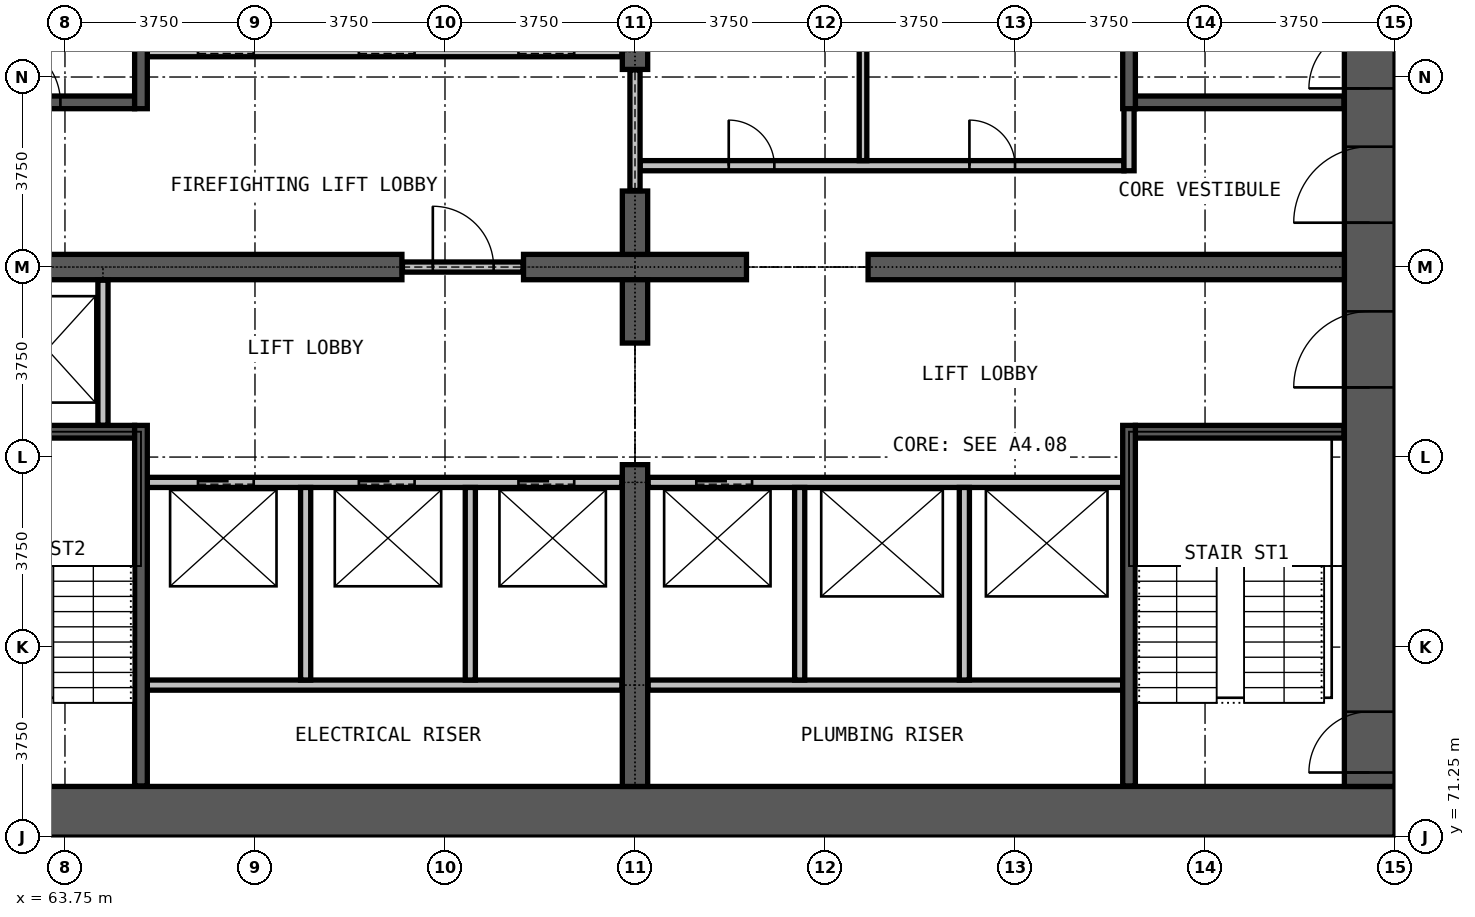
"""IFC4 building model, lengths in metres.
Left out: names, types, materials, properties, quantities, classifications, styles, units other than length and angle.
Written with IfcOpenShell. Run it as: python <this file> out.ifc"""

import sys

from ifc_helpers import new_model, si_unit, direction, frame, frame_2d, origin, place, context, subcontext, project, spatial, rectangle, extrude, element, fill, save


model = new_model("IFC4")
c1 = context("Model", 3, precision=1e-05, world=origin(), true_north=direction((0.0, 1.0)))
c2 = subcontext(c1, "Body", "Model", "MODEL_VIEW")
j1 = project(units=[si_unit("LENGTHUNIT", "METRE"), si_unit("PLANEANGLEUNIT", "RADIAN")], contexts=[c1])
p1 = place(None, origin())
s1 = spatial("IfcSite", under=j1, at=p1, CompositionType="ELEMENT")
p2 = place(p1, origin())
s2 = spatial("IfcBuilding", under=s1, at=p2, CompositionType="ELEMENT")
p3 = place(p2, frame((0.0, 0.0, 59.3)))
s3 = spatial("IfcBuildingStorey", under=s2, at=p3, CompositionType="ELEMENT", Elevation=59.3)
p4 = place(p3, frame((60.0, 71.75, 0.0), z_axis=(0.0, 0.0, 1.0), x_axis=(1.0, 0.0, 0.0)))
e1 = element("IfcWall", 1, at=p4, inside=s3, PredefinedType="SHEAR", context=c2, shape_type="SweptSolid", body=[
    extrude(rectangle(XDim=30.0, YDim=1.0, at=frame_2d((15.0, 0.0))), origin(), (0.0, 0.0, 1.0), 3.3),
])
p5 = place(p3, frame((89.5, 72.25, 0.0), z_axis=(0.0, 0.0, 1.0), x_axis=(0.0, 1.0, 0.0)))
e2 = element("IfcWall", 2, at=p5, inside=s3, PredefinedType="SHEAR", context=c2, shape_type="SweptSolid", body=[
    extrude(rectangle(XDim=20.5, YDim=1.0, at=frame_2d((10.25, 0.0))), origin(), (0.0, 0.0, 1.0), 3.3),
])
p6 = place(p5, frame((0.275, 0.0, 0.0)))
e3 = element("IfcOpeningElement", 3, at=p6, cuts=e2, PredefinedType="OPENING", context=c2, shape_type="SweptSolid", body=[
    extrude(rectangle(XDim=1.2, YDim=2.2, at=frame_2d((0.6, 1.1))), frame((0.0, 0.51, 0.0), z_axis=(0.0, -1.0, 0.0), x_axis=(1.0, 0.0, 0.0)), (0.0, 0.0, 1.0), 1.02),
])
p7 = place(p5, frame((13.775, 0.0, 0.0)))
e4 = element("IfcOpeningElement", 4, at=p7, cuts=e2, PredefinedType="OPENING", context=c2, shape_type="SweptSolid", body=[
    extrude(rectangle(XDim=1.2, YDim=2.2, at=frame_2d((0.6, 1.1))), frame((0.0, 0.51, 0.0), z_axis=(0.0, -1.0, 0.0), x_axis=(1.0, 0.0, 0.0)), (0.0, 0.0, 1.0), 1.02),
])
p8 = place(p5, frame((7.875, 0.0, 0.0)))
e5 = element("IfcOpeningElement", 5, at=p8, cuts=e2, PredefinedType="OPENING", context=c2, shape_type="SweptSolid", body=[
    extrude(rectangle(XDim=1.5, YDim=2.2, at=frame_2d((0.75, 1.1))), frame((0.0, 0.51, 0.0), z_axis=(0.0, -1.0, 0.0), x_axis=(1.0, 0.0, 0.0)), (0.0, 0.0, 1.0), 1.02),
])
p9 = place(p5, frame((11.125, 0.0, 0.0)))
e6 = element("IfcOpeningElement", 6, at=p9, cuts=e2, PredefinedType="OPENING", context=c2, shape_type="SweptSolid", body=[
    extrude(rectangle(XDim=1.5, YDim=2.2, at=frame_2d((0.75, 1.1))), frame((0.0, 0.51, 0.0), z_axis=(0.0, -1.0, 0.0), x_axis=(1.0, 0.0, 0.0)), (0.0, 0.0, 1.0), 1.02),
])
p10 = place(p3, frame((61.0, 82.5, 0.0), z_axis=(0.0, 0.0, 1.0), x_axis=(1.0, 0.0, 0.0)))
e7 = element("IfcWall", 7, at=p10, inside=s3, PredefinedType="SHEAR", context=c2, shape_type="SweptSolid", body=[
    extrude(rectangle(XDim=9.4, YDim=0.5, at=frame_2d((4.7, 0.0))), origin(), (0.0, 0.0, 1.0), 3.3),
])
p11 = place(p3, frame((72.8, 82.5, 0.0), z_axis=(0.0, 0.0, 1.0), x_axis=(1.0, 0.0, 0.0)))
e8 = element("IfcWall", 8, at=p11, inside=s3, PredefinedType="SHEAR", context=c2, shape_type="SweptSolid", body=[
    extrude(rectangle(XDim=4.4, YDim=0.5, at=frame_2d((2.2, 0.0))), origin(), (0.0, 0.0, 1.0), 3.3),
])
p12 = place(p3, frame((79.6, 82.5, 0.0), z_axis=(0.0, 0.0, 1.0), x_axis=(1.0, 0.0, 0.0)))
e9 = element("IfcWall", 9, at=p12, inside=s3, PredefinedType="SHEAR", context=c2, shape_type="SweptSolid", body=[
    extrude(rectangle(XDim=9.4, YDim=0.5, at=frame_2d((4.7, 0.0))), origin(), (0.0, 0.0, 1.0), 3.3),
])
p13 = place(p3, frame((75.0, 72.25, 0.0), z_axis=(0.0, 0.0, 1.0), x_axis=(0.0, 1.0, 0.0)))
e10 = element("IfcWall", 10, at=p13, inside=s3, PredefinedType="SHEAR", context=c2, shape_type="SweptSolid", body=[
    extrude(rectangle(XDim=6.35, YDim=0.5, at=frame_2d((3.175, 0.0))), origin(), (0.0, 0.0, 1.0), 3.3),
])
for number, where, z_axis, x_axis in (
    (11, (75.0, 81.0, 0.0), (0.0, 0.0, 1.0), (0.0, 1.0, 0.0)),
    (12, (75.0, 82.75, 0.0), (0.0, 0.0, 1.0), (0.0, 1.0, 0.0)),
):
    element("IfcWall", number, at=place(p3, frame(where, z_axis=z_axis, x_axis=x_axis)), inside=s3, PredefinedType="SHEAR", context=c2, shape_type="SweptSolid", body=[
        extrude(rectangle(XDim=1.25, YDim=0.5, at=frame_2d((0.625, 0.0))), origin(), (0.0, 0.0, 1.0), 3.3),
    ])
p14 = place(p3, frame((75.0, 86.4, 0.0), z_axis=(0.0, 0.0, 1.0), x_axis=(0.0, 1.0, 0.0)))
e13 = element("IfcWall", 13, at=p14, inside=s3, PredefinedType="SHEAR", context=c2, shape_type="SweptSolid", body=[
    extrude(rectangle(XDim=6.35, YDim=0.5, at=frame_2d((3.175, 0.0))), origin(), (0.0, 0.0, 1.0), 3.3),
])
p15 = place(p3, frame((70.41, 82.5, 0.0), z_axis=(0.0, 0.0, 1.0), x_axis=(1.0, 0.0, 0.0)))
e14 = element("IfcWall", 14, at=p15, inside=s3, PredefinedType="PARTITIONING", context=c2, shape_type="SweptSolid", body=[
    extrude(rectangle(XDim=2.38, YDim=0.2, at=frame_2d((1.19, 0.0))), origin(), (0.0, 0.0, 1.0), 2.4),
])
p16 = place(p15, frame((0.6, 0.0, 0.0)))
e15 = element("IfcOpeningElement", 15, at=p16, cuts=e14, PredefinedType="OPENING", context=c2, shape_type="SweptSolid", body=[
    extrude(rectangle(XDim=1.2, YDim=2.2, at=frame_2d((0.6, 1.1))), frame((0.0, 0.11, 0.0), z_axis=(0.0, -1.0, 0.0), x_axis=(1.0, 0.0, 0.0)), (0.0, 0.0, 1.0), 0.22),
])
p17 = place(p3, frame((75.1, 84.5, 0.0), z_axis=(0.0, 0.0, 1.0), x_axis=(1.0, 0.0, 0.0)))
e16 = element("IfcWall", 16, at=p17, inside=s3, PredefinedType="PARTITIONING", context=c2, shape_type="SweptSolid", body=[
    extrude(rectangle(XDim=9.55, YDim=0.2, at=frame_2d((4.775, 0.0))), origin(), (0.0, 0.0, 1.0), 3.0),
])
p18 = place(p17, frame((1.75, 0.0, 0.0)))
e17 = element("IfcOpeningElement", 17, at=p18, cuts=e16, PredefinedType="OPENING", context=c2, shape_type="SweptSolid", body=[
    extrude(rectangle(XDim=0.9, YDim=2.2, at=frame_2d((0.45, 1.1))), frame((0.0, 0.11, 0.0), z_axis=(0.0, -1.0, 0.0), x_axis=(1.0, 0.0, 0.0)), (0.0, 0.0, 1.0), 0.22),
])
p19 = place(p17, frame((6.5, 0.0, 0.0)))
e18 = element("IfcOpeningElement", 18, at=p19, cuts=e16, PredefinedType="OPENING", context=c2, shape_type="SweptSolid", body=[
    extrude(rectangle(XDim=0.9, YDim=2.2, at=frame_2d((0.45, 1.1))), frame((0.0, 0.11, 0.0), z_axis=(0.0, -1.0, 0.0), x_axis=(1.0, 0.0, 0.0)), (0.0, 0.0, 1.0), 0.22),
])
p20 = place(p3, frame((75.0, 84.01, 0.0), z_axis=(0.0, 0.0, 1.0), x_axis=(0.0, 1.0, 0.0)))
e19 = element("IfcWall", 19, at=p20, inside=s3, PredefinedType="PARTITIONING", context=c2, shape_type="SweptSolid", body=[
    extrude(rectangle(XDim=2.38, YDim=0.2, at=frame_2d((1.19, 0.0))), origin(), (0.0, 0.0, 1.0), 2.4),
])
p21 = place(p3, frame((84.75, 84.4, 0.0), z_axis=(0.0, 0.0, 1.0), x_axis=(0.0, 1.0, 0.0)))
e20 = element("IfcWall", 20, at=p21, inside=s3, PredefinedType="PARTITIONING", context=c2, shape_type="SweptSolid", body=[
    extrude(rectangle(XDim=1.475, YDim=0.2, at=frame_2d((0.738, 0.0))), origin(), (0.0, 0.0, 1.0), 3.0),
])
p22 = place(p3, frame((79.5, 84.6, 0.0), z_axis=(0.0, 0.0, 1.0), x_axis=(0.0, 1.0, 0.0)))
e21 = element("IfcWall", 21, at=p22, inside=s3, PredefinedType="PARTITIONING", context=c2, shape_type="SweptSolid", body=[
    extrude(rectangle(XDim=6.05, YDim=0.15, at=frame_2d((3.025, 0.0))), origin(), (0.0, 0.0, 1.0), 3.0),
])
for number, where, z_axis, x_axis in (
    (22, (65.375, 74.25, 0.0), (0.0, 0.0, 1.0), (1.0, 0.0, 0.0)),
    (23, (75.26, 74.25, 0.0), (0.0, 0.0, 1.0), (1.0, 0.0, 0.0)),
):
    element("IfcWall", number, at=place(p3, frame(where, z_axis=z_axis, x_axis=x_axis)), inside=s3, PredefinedType="PARTITIONING", context=c2, shape_type="SweptSolid", body=[
        extrude(rectangle(XDim=9.365, YDim=0.2, at=frame_2d((4.683, 0.0))), origin(), (0.0, 0.0, 1.0), 3.0),
    ])
p23 = place(p3, frame((65.375, 78.25, 0.0), z_axis=(0.0, 0.0, 1.0), x_axis=(1.0, 0.0, 0.0)))
e24 = element("IfcWall", 24, at=p23, inside=s3, PredefinedType="PARTITIONING", context=c2, shape_type="SweptSolid", body=[
    extrude(rectangle(XDim=9.365, YDim=0.2, at=frame_2d((4.683, 0.0))), origin(), (0.0, 0.0, 1.0), 3.0),
])
p24 = place(p23, frame((1.0, 0.0, 0.0)))
e25 = element("IfcOpeningElement", 25, at=p24, cuts=e24, PredefinedType="OPENING", context=c2, shape_type="SweptSolid", body=[
    extrude(rectangle(XDim=1.1, YDim=2.2, at=frame_2d((0.55, 1.1))), frame((0.0, 0.11, 0.0), z_axis=(0.0, -1.0, 0.0), x_axis=(1.0, 0.0, 0.0)), (0.0, 0.0, 1.0), 0.22),
])
p25 = place(p23, frame((4.175, 0.0, 0.0)))
e26 = element("IfcOpeningElement", 26, at=p25, cuts=e24, PredefinedType="OPENING", context=c2, shape_type="SweptSolid", body=[
    extrude(rectangle(XDim=1.1, YDim=2.2, at=frame_2d((0.55, 1.1))), frame((0.0, 0.11, 0.0), z_axis=(0.0, -1.0, 0.0), x_axis=(1.0, 0.0, 0.0)), (0.0, 0.0, 1.0), 0.22),
])
p26 = place(p23, frame((7.325, 0.0, 0.0)))
e27 = element("IfcOpeningElement", 27, at=p26, cuts=e24, PredefinedType="OPENING", context=c2, shape_type="SweptSolid", body=[
    extrude(rectangle(XDim=1.1, YDim=2.2, at=frame_2d((0.55, 1.1))), frame((0.0, 0.11, 0.0), z_axis=(0.0, -1.0, 0.0), x_axis=(1.0, 0.0, 0.0)), (0.0, 0.0, 1.0), 0.22),
])
p27 = place(p3, frame((75.26, 78.25, 0.0), z_axis=(0.0, 0.0, 1.0), x_axis=(1.0, 0.0, 0.0)))
e28 = element("IfcWall", 28, at=p27, inside=s3, PredefinedType="PARTITIONING", context=c2, shape_type="SweptSolid", body=[
    extrude(rectangle(XDim=9.365, YDim=0.2, at=frame_2d((4.683, 0.0))), origin(), (0.0, 0.0, 1.0), 3.0),
])
p28 = place(p27, frame((0.95, 0.0, 0.0)))
e29 = element("IfcOpeningElement", 29, at=p28, cuts=e28, PredefinedType="OPENING", context=c2, shape_type="SweptSolid", body=[
    extrude(rectangle(XDim=1.1, YDim=2.2, at=frame_2d((0.55, 1.1))), frame((0.0, 0.11, 0.0), z_axis=(0.0, -1.0, 0.0), x_axis=(1.0, 0.0, 0.0)), (0.0, 0.0, 1.0), 0.22),
])
p29 = place(p3, frame((65.375, 86.75, 0.0), z_axis=(0.0, 0.0, 1.0), x_axis=(1.0, 0.0, 0.0)))
e30 = element("IfcWall", 30, at=p29, inside=s3, PredefinedType="PARTITIONING", context=c2, shape_type="SweptSolid", body=[
    extrude(rectangle(XDim=9.365, YDim=0.2, at=frame_2d((4.683, 0.0))), origin(), (0.0, 0.0, 1.0), 3.0),
])
p30 = place(p29, frame((1.0, 0.0, 0.0)))
e31 = element("IfcOpeningElement", 31, at=p30, cuts=e30, PredefinedType="OPENING", context=c2, shape_type="SweptSolid", body=[
    extrude(rectangle(XDim=1.1, YDim=2.2, at=frame_2d((0.55, 1.1))), frame((0.0, 0.11, 0.0), z_axis=(0.0, -1.0, 0.0), x_axis=(1.0, 0.0, 0.0)), (0.0, 0.0, 1.0), 0.22),
])
p31 = place(p29, frame((4.175, 0.0, 0.0)))
e32 = element("IfcOpeningElement", 32, at=p31, cuts=e30, PredefinedType="OPENING", context=c2, shape_type="SweptSolid", body=[
    extrude(rectangle(XDim=1.1, YDim=2.2, at=frame_2d((0.55, 1.1))), frame((0.0, 0.11, 0.0), z_axis=(0.0, -1.0, 0.0), x_axis=(1.0, 0.0, 0.0)), (0.0, 0.0, 1.0), 0.22),
])
p32 = place(p29, frame((7.325, 0.0, 0.0)))
e33 = element("IfcOpeningElement", 33, at=p32, cuts=e30, PredefinedType="OPENING", context=c2, shape_type="SweptSolid", body=[
    extrude(rectangle(XDim=1.1, YDim=2.2, at=frame_2d((0.55, 1.1))), frame((0.0, 0.11, 0.0), z_axis=(0.0, -1.0, 0.0), x_axis=(1.0, 0.0, 0.0)), (0.0, 0.0, 1.0), 0.22),
])
p33 = place(p3, frame((64.5, 79.375, 0.0), z_axis=(0.0, 0.0, 1.0), x_axis=(0.0, 1.0, 0.0)))
e34 = element("IfcWall", 34, at=p33, inside=s3, PredefinedType="PARTITIONING", context=c2, shape_type="SweptSolid", body=[
    extrude(rectangle(XDim=2.865, YDim=0.2, at=frame_2d((1.433, 0.0))), origin(), (0.0, 0.0, 1.0), 3.0),
])
for number, where, z_axis, x_axis in (
    (35, (68.5, 74.35, 0.0), (0.0, 0.0, 1.0), (0.0, 1.0, 0.0)),
    (36, (71.75, 74.35, 0.0), (0.0, 0.0, 1.0), (0.0, 1.0, 0.0)),
    (37, (78.25, 74.35, 0.0), (0.0, 0.0, 1.0), (0.0, 1.0, 0.0)),
    (38, (81.5, 74.35, 0.0), (0.0, 0.0, 1.0), (0.0, 1.0, 0.0)),
):
    element("IfcWall", number, at=place(p3, frame(where, z_axis=z_axis, x_axis=x_axis)), inside=s3, PredefinedType="PARTITIONING", context=c2, shape_type="SweptSolid", body=[
        extrude(rectangle(XDim=3.8, YDim=0.2, at=frame_2d((1.9, 0.0))), origin(), (0.0, 0.0, 1.0), 3.0),
    ])
for number, where, z_axis, x_axis in (
    (39, (61.01, 79.25, 0.0), (0.0, 0.0, 1.0), (1.0, 0.0, 0.0)),
    (40, (84.875, 79.25, 0.0), (0.0, 0.0, 1.0), (1.0, 0.0, 0.0)),
):
    element("IfcWall", number, at=place(p3, frame(where, z_axis=z_axis, x_axis=x_axis)), inside=s3, PredefinedType="PARTITIONING", context=c2, shape_type="SweptSolid", body=[
        extrude(rectangle(XDim=4.115, YDim=0.25, at=frame_2d((2.058, 0.0))), origin(), (0.0, 0.0, 1.0), 3.0),
    ])
p34 = place(p3, frame((61.01, 85.75, 0.0), z_axis=(0.0, 0.0, 1.0), x_axis=(1.0, 0.0, 0.0)))
e41 = element("IfcWall", 41, at=p34, inside=s3, PredefinedType="PARTITIONING", context=c2, shape_type="SweptSolid", body=[
    extrude(rectangle(XDim=4.115, YDim=0.25, at=frame_2d((2.058, 0.0))), origin(), (0.0, 0.0, 1.0), 3.0),
])
p35 = place(p34, frame((1.45, 0.0, 0.0)))
e42 = element("IfcOpeningElement", 42, at=p35, cuts=e41, PredefinedType="OPENING", context=c2, shape_type="SweptSolid", body=[
    extrude(rectangle(XDim=1.2, YDim=2.2, at=frame_2d((0.6, 1.1))), frame((0.0, 0.135, 0.0), z_axis=(0.0, -1.0, 0.0), x_axis=(1.0, 0.0, 0.0)), (0.0, 0.0, 1.0), 0.27),
])
p36 = place(p3, frame((84.875, 85.75, 0.0), z_axis=(0.0, 0.0, 1.0), x_axis=(1.0, 0.0, 0.0)))
e43 = element("IfcWall", 43, at=p36, inside=s3, PredefinedType="PARTITIONING", context=c2, shape_type="SweptSolid", body=[
    extrude(rectangle(XDim=4.115, YDim=0.25, at=frame_2d((2.058, 0.0))), origin(), (0.0, 0.0, 1.0), 3.0),
])
for number, where, z_axis, x_axis in (
    (44, (65.25, 72.26, 0.0), (0.0, 0.0, 1.0), (0.0, 1.0, 0.0)),
    (45, (65.25, 85.625, 0.0), (0.0, 0.0, 1.0), (0.0, 1.0, 0.0)),
    (46, (84.75, 72.26, 0.0), (0.0, 0.0, 1.0), (0.0, 1.0, 0.0)),
    (47, (84.75, 85.625, 0.0), (0.0, 0.0, 1.0), (0.0, 1.0, 0.0)),
):
    element("IfcWall", number, at=place(p3, frame(where, z_axis=z_axis, x_axis=x_axis)), inside=s3, PredefinedType="PARTITIONING", context=c2, shape_type="SweptSolid", body=[
        extrude(rectangle(XDim=7.115, YDim=0.25, at=frame_2d((3.558, 0.0))), origin(), (0.0, 0.0, 1.0), 3.0),
    ])
p37 = place(p24, origin())
e48 = element("IfcDoor", 48, at=p37, inside=s3, OperationType="DOUBLE_DOOR_SLIDING", PredefinedType="DOOR", context=c2, shape_type="SweptSolid", body=[
    extrude(rectangle(XDim=1.1, YDim=2.2, at=frame_2d((0.55, 1.1))), frame((0.0, 0.025, 0.0), z_axis=(0.0, -1.0, 0.0), x_axis=(1.0, 0.0, 0.0)), (0.0, 0.0, 1.0), 0.05),
])
fill(e25, e48)
p38 = place(p25, origin())
e49 = element("IfcDoor", 49, at=p38, inside=s3, OperationType="DOUBLE_DOOR_SLIDING", PredefinedType="DOOR", context=c2, shape_type="SweptSolid", body=[
    extrude(rectangle(XDim=1.1, YDim=2.2, at=frame_2d((0.55, 1.1))), frame((0.0, 0.025, 0.0), z_axis=(0.0, -1.0, 0.0), x_axis=(1.0, 0.0, 0.0)), (0.0, 0.0, 1.0), 0.05),
])
fill(e26, e49)
p39 = place(p26, origin())
e50 = element("IfcDoor", 50, at=p39, inside=s3, OperationType="DOUBLE_DOOR_SLIDING", PredefinedType="DOOR", context=c2, shape_type="SweptSolid", body=[
    extrude(rectangle(XDim=1.1, YDim=2.2, at=frame_2d((0.55, 1.1))), frame((0.0, 0.025, 0.0), z_axis=(0.0, -1.0, 0.0), x_axis=(1.0, 0.0, 0.0)), (0.0, 0.0, 1.0), 0.05),
])
fill(e27, e50)
p40 = place(p28, origin())
e51 = element("IfcDoor", 51, at=p40, inside=s3, OperationType="DOUBLE_DOOR_SLIDING", PredefinedType="DOOR", context=c2, shape_type="SweptSolid", body=[
    extrude(rectangle(XDim=1.1, YDim=2.2, at=frame_2d((0.55, 1.1))), frame((0.0, 0.025, 0.0), z_axis=(0.0, -1.0, 0.0), x_axis=(1.0, 0.0, 0.0)), (0.0, 0.0, 1.0), 0.05),
])
fill(e29, e51)
p41 = place(p30, origin())
e52 = element("IfcDoor", 52, at=p41, inside=s3, OperationType="DOUBLE_DOOR_SLIDING", PredefinedType="DOOR", context=c2, shape_type="SweptSolid", body=[
    extrude(rectangle(XDim=1.1, YDim=2.2, at=frame_2d((0.55, 1.1))), frame((0.0, 0.025, 0.0), z_axis=(0.0, -1.0, 0.0), x_axis=(1.0, 0.0, 0.0)), (0.0, 0.0, 1.0), 0.05),
])
fill(e31, e52)
p42 = place(p31, origin())
e53 = element("IfcDoor", 53, at=p42, inside=s3, OperationType="DOUBLE_DOOR_SLIDING", PredefinedType="DOOR", context=c2, shape_type="SweptSolid", body=[
    extrude(rectangle(XDim=1.1, YDim=2.2, at=frame_2d((0.55, 1.1))), frame((0.0, 0.025, 0.0), z_axis=(0.0, -1.0, 0.0), x_axis=(1.0, 0.0, 0.0)), (0.0, 0.0, 1.0), 0.05),
])
fill(e32, e53)
p43 = place(p32, origin())
e54 = element("IfcDoor", 54, at=p43, inside=s3, OperationType="DOUBLE_DOOR_SLIDING", PredefinedType="DOOR", context=c2, shape_type="SweptSolid", body=[
    extrude(rectangle(XDim=1.1, YDim=2.2, at=frame_2d((0.55, 1.1))), frame((0.0, 0.025, 0.0), z_axis=(0.0, -1.0, 0.0), x_axis=(1.0, 0.0, 0.0)), (0.0, 0.0, 1.0), 0.05),
])
fill(e33, e54)
p44 = place(p16, origin())
e55 = element("IfcDoor", 55, at=p44, inside=s3, OperationType="SINGLE_SWING_RIGHT", PredefinedType="DOOR", context=c2, shape_type="SweptSolid", body=[
    extrude(rectangle(XDim=1.2, YDim=2.2, at=frame_2d((0.6, 1.1))), frame((0.0, 0.025, 0.0), z_axis=(0.0, -1.0, 0.0), x_axis=(1.0, 0.0, 0.0)), (0.0, 0.0, 1.0), 0.05),
])
fill(e15, e55)
p45 = place(p35, origin())
e56 = element("IfcDoor", 56, at=p45, inside=s3, OperationType="SINGLE_SWING_LEFT", PredefinedType="DOOR", context=c2, shape_type="SweptSolid", body=[
    extrude(rectangle(XDim=1.2, YDim=2.2, at=frame_2d((0.6, 1.1))), frame((0.0, 0.025, 0.0), z_axis=(0.0, -1.0, 0.0), x_axis=(1.0, 0.0, 0.0)), (0.0, 0.0, 1.0), 0.05),
])
fill(e42, e56)
p46 = place(p6, origin())
e57 = element("IfcDoor", 57, at=p46, inside=s3, OperationType="SINGLE_SWING_LEFT", PredefinedType="DOOR", context=c2, shape_type="SweptSolid", body=[
    extrude(rectangle(XDim=1.2, YDim=2.2, at=frame_2d((0.6, 1.1))), frame((0.0, 0.025, 0.0), z_axis=(0.0, -1.0, 0.0), x_axis=(1.0, 0.0, 0.0)), (0.0, 0.0, 1.0), 0.05),
])
fill(e3, e57)
p47 = place(p7, origin())
e58 = element("IfcDoor", 58, at=p47, inside=s3, OperationType="SINGLE_SWING_LEFT", PredefinedType="DOOR", context=c2, shape_type="SweptSolid", body=[
    extrude(rectangle(XDim=1.2, YDim=2.2, at=frame_2d((0.6, 1.1))), frame((0.0, 0.025, 0.0), z_axis=(0.0, -1.0, 0.0), x_axis=(1.0, 0.0, 0.0)), (0.0, 0.0, 1.0), 0.05),
])
fill(e4, e58)
p48 = place(p8, origin())
e59 = element("IfcDoor", 59, at=p48, inside=s3, OperationType="DOUBLE_DOOR_SINGLE_SWING", PredefinedType="DOOR", context=c2, shape_type="SweptSolid", body=[
    extrude(rectangle(XDim=1.5, YDim=2.2, at=frame_2d((0.75, 1.1))), frame((0.0, 0.025, 0.0), z_axis=(0.0, -1.0, 0.0), x_axis=(1.0, 0.0, 0.0)), (0.0, 0.0, 1.0), 0.05),
])
fill(e5, e59)
p49 = place(p9, origin())
e60 = element("IfcDoor", 60, at=p49, inside=s3, OperationType="DOUBLE_DOOR_SINGLE_SWING", PredefinedType="DOOR", context=c2, shape_type="SweptSolid", body=[
    extrude(rectangle(XDim=1.5, YDim=2.2, at=frame_2d((0.75, 1.1))), frame((0.0, 0.025, 0.0), z_axis=(0.0, -1.0, 0.0), x_axis=(1.0, 0.0, 0.0)), (0.0, 0.0, 1.0), 0.05),
])
fill(e6, e60)
p50 = place(p18, origin())
e61 = element("IfcDoor", 61, at=p50, inside=s3, OperationType="SINGLE_SWING_RIGHT", PredefinedType="DOOR", context=c2, shape_type="SweptSolid", body=[
    extrude(rectangle(XDim=0.9, YDim=2.2, at=frame_2d((0.45, 1.1))), frame((0.0, 0.025, 0.0), z_axis=(0.0, -1.0, 0.0), x_axis=(1.0, 0.0, 0.0)), (0.0, 0.0, 1.0), 0.05),
])
fill(e17, e61)
p51 = place(p19, origin())
e62 = element("IfcDoor", 62, at=p51, inside=s3, OperationType="SINGLE_SWING_RIGHT", PredefinedType="DOOR", context=c2, shape_type="SweptSolid", body=[
    extrude(rectangle(XDim=0.9, YDim=2.2, at=frame_2d((0.45, 1.1))), frame((0.0, 0.025, 0.0), z_axis=(0.0, -1.0, 0.0), x_axis=(1.0, 0.0, 0.0)), (0.0, 0.0, 1.0), 0.05),
])
fill(e18, e62)
save(model, sys.argv[1])
